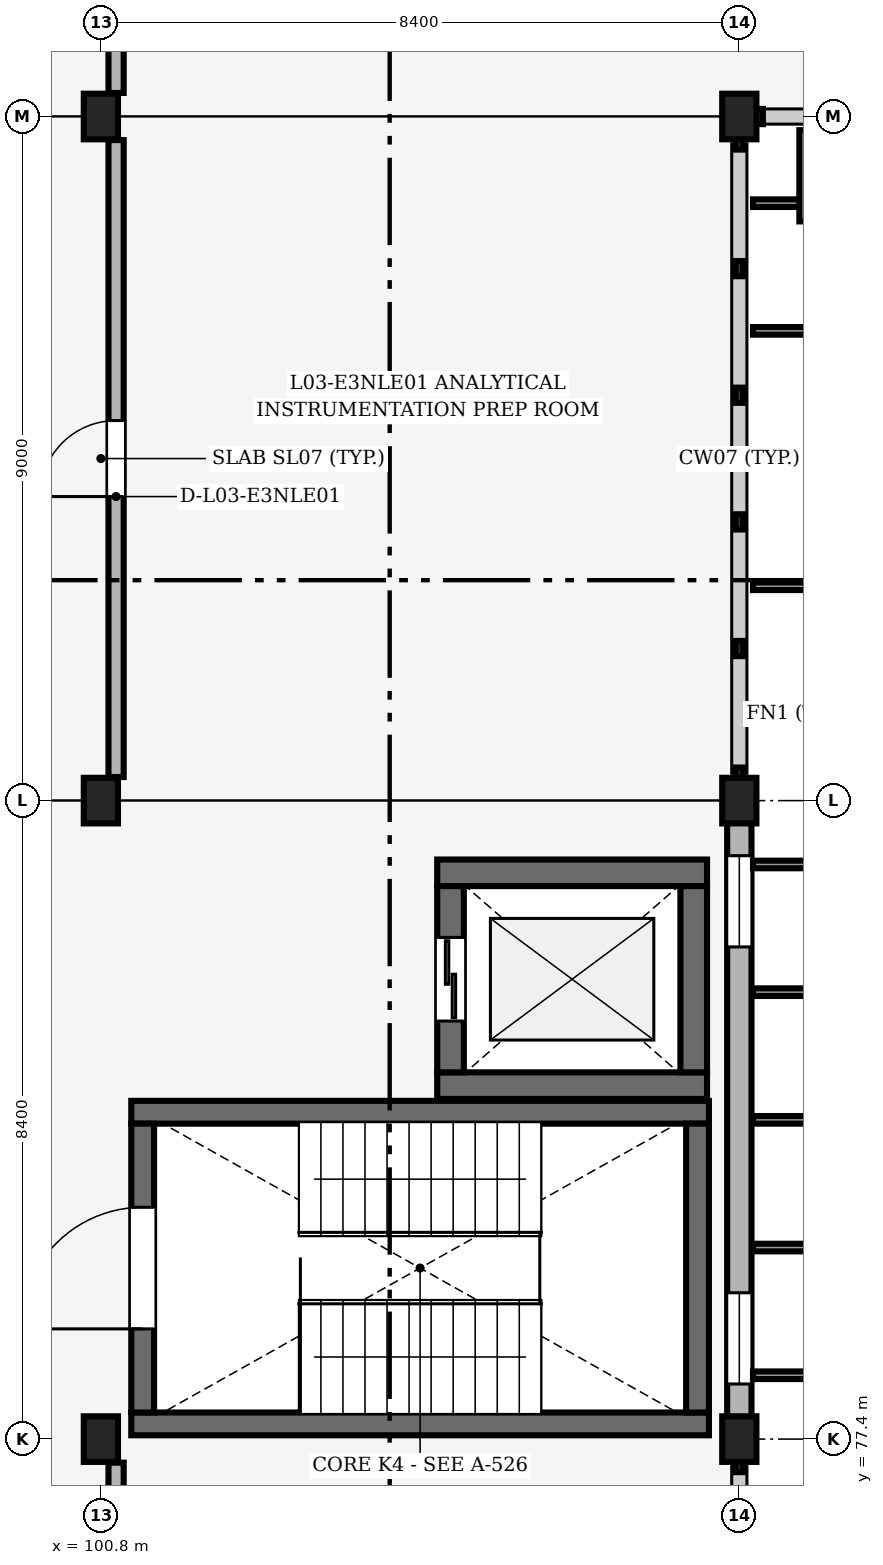
"""IFC4 building model, lengths in metres.
Left out: names, types, materials, properties, quantities, classifications, styles, units other than length and angle.
Written with IfcOpenShell. Run it as: python <this file> out.ifc"""

import sys

from ifc_helpers import new_model, si_unit, direction, frame, frame_2d, origin, origin_2d, place, context, subcontext, project, spatial, rectangle, extrude, element, fill, save


model = new_model("IFC4")
c1 = context("Model", 3, precision=1e-05, world=origin(), true_north=direction((0.0, 1.0)))
c2 = subcontext(c1, "Body", "Model", "MODEL_VIEW")
j1 = project(units=[si_unit("LENGTHUNIT", "METRE"), si_unit("PLANEANGLEUNIT", "RADIAN")], contexts=[c1])
p1 = place(None, origin())
s1 = spatial("IfcSite", under=j1, at=p1, CompositionType="ELEMENT")
p2 = place(p1, origin())
s2 = spatial("IfcBuilding", under=s1, at=p2, CompositionType="ELEMENT")
p3 = place(p2, frame((0.0, 0.0, 13.2)))
s3 = spatial("IfcBuildingStorey", under=s2, at=p3, CompositionType="ELEMENT", Elevation=13.2)
for number, where, z_axis, x_axis in (
    (1, (100.8, 77.4, 0.0), (0.0, 0.0, 1.0), (1.0, 0.0, 0.0)),
    (2, (100.8, 85.8, 0.0), (0.0, 0.0, 1.0), (1.0, 0.0, 0.0)),
    (3, (100.8, 94.8, 0.0), (0.0, 0.0, 1.0), (1.0, 0.0, 0.0)),
    (4, (109.2, 77.4, 0.0), (0.0, 0.0, 1.0), (1.0, 0.0, 0.0)),
    (5, (109.2, 85.8, 0.0), (0.0, 0.0, 1.0), (1.0, 0.0, 0.0)),
    (6, (109.2, 94.8, 0.0), (0.0, 0.0, 1.0), (1.0, 0.0, 0.0)),
):
    element("IfcColumn", number, at=place(p3, frame(where, z_axis=z_axis, x_axis=x_axis)), inside=s3, PredefinedType="COLUMN", context=c2, shape_type="SweptSolid", body=[
        extrude(rectangle(XDim=0.45, YDim=0.6, at=origin_2d()), origin(), (0.0, 0.0, 1.0), 4.2),
    ])
p4 = place(p3, frame((109.2, 77.675, 0.0), z_axis=(0.0, 0.0, 1.0), x_axis=(0.0, 1.0, 0.0)))
e7 = element("IfcWall", 7, at=p4, inside=s3, PredefinedType="SOLIDWALL", context=c2, shape_type="SweptSolid", body=[
    extrude(rectangle(XDim=7.85, YDim=0.32, at=frame_2d((3.925, 0.0))), origin(), (0.0, 0.0, 1.0), 2.94),
])
p5 = place(p4, frame((0.45, 0.0, 0.85)))
e8 = element("IfcOpeningElement", 8, at=p5, cuts=e7, PredefinedType="OPENING", context=c2, shape_type="SweptSolid", body=[
    extrude(rectangle(XDim=1.2, YDim=1.8, at=frame_2d((0.6, 0.9))), frame((0.0, 0.17, 0.0), z_axis=(0.0, -1.0, 0.0), x_axis=(1.0, 0.0, 0.0)), (0.0, 0.0, 1.0), 0.34),
])
p6 = place(p4, frame((6.2, 0.0, 0.85)))
e9 = element("IfcOpeningElement", 9, at=p6, cuts=e7, PredefinedType="OPENING", context=c2, shape_type="SweptSolid", body=[
    extrude(rectangle(XDim=1.2, YDim=1.8, at=frame_2d((0.6, 0.9))), frame((0.0, 0.17, 0.0), z_axis=(0.0, -1.0, 0.0), x_axis=(1.0, 0.0, 0.0)), (0.0, 0.0, 1.0), 0.34),
])
for number, where, z_axis, x_axis in (
    (10, (101.2, 77.6, 0.0), (0.0, 0.0, 1.0), (1.0, 0.0, 0.0)),
    (11, (101.2, 81.7, 0.0), (0.0, 0.0, 1.0), (1.0, 0.0, 0.0)),
):
    element("IfcWall", number, at=place(p3, frame(where, z_axis=z_axis, x_axis=x_axis)), inside=s3, PredefinedType="SHEAR", context=c2, shape_type="SweptSolid", body=[
        extrude(rectangle(XDim=7.6, YDim=0.3, at=frame_2d((3.8, 0.0))), origin(), (0.0, 0.0, 1.0), 4.025),
    ])
p7 = place(p3, frame((101.35, 77.75, 0.0), z_axis=(0.0, 0.0, 1.0), x_axis=(0.0, 1.0, 0.0)))
e12 = element("IfcWall", 12, at=p7, inside=s3, PredefinedType="SHEAR", context=c2, shape_type="SweptSolid", body=[
    extrude(rectangle(XDim=3.8, YDim=0.3, at=frame_2d((1.9, 0.0))), origin(), (0.0, 0.0, 1.0), 4.025),
])
p8 = place(p7, frame((1.1, 0.0, 0.0)))
e13 = element("IfcOpeningElement", 13, at=p8, cuts=e12, PredefinedType="OPENING", context=c2, shape_type="SweptSolid", body=[
    extrude(rectangle(XDim=1.6, YDim=2.2, at=frame_2d((0.8, 1.1))), frame((0.0, 0.16, 0.0), z_axis=(0.0, -1.0, 0.0), x_axis=(1.0, 0.0, 0.0)), (0.0, 0.0, 1.0), 0.32),
])
p9 = place(p3, frame((108.65, 77.75, 0.0), z_axis=(0.0, 0.0, 1.0), x_axis=(0.0, 1.0, 0.0)))
e14 = element("IfcWall", 14, at=p9, inside=s3, PredefinedType="SHEAR", context=c2, shape_type="SweptSolid", body=[
    extrude(rectangle(XDim=3.8, YDim=0.3, at=frame_2d((1.9, 0.0))), origin(), (0.0, 0.0, 1.0), 4.025),
])
for number, where, z_axis, x_axis in (
    (15, (105.225, 82.05, 0.0), (0.0, 0.0, 1.0), (1.0, 0.0, 0.0)),
    (16, (105.225, 84.85, 0.0), (0.0, 0.0, 1.0), (1.0, 0.0, 0.0)),
):
    element("IfcWall", number, at=place(p3, frame(where, z_axis=z_axis, x_axis=x_axis)), inside=s3, PredefinedType="SHEAR", context=c2, shape_type="SweptSolid", body=[
        extrude(rectangle(XDim=3.55, YDim=0.35, at=frame_2d((1.775, 0.0))), origin(), (0.0, 0.0, 1.0), 3.92),
    ])
p10 = place(p3, frame((105.4, 82.225, 0.0), z_axis=(0.0, 0.0, 1.0), x_axis=(0.0, 1.0, 0.0)))
e17 = element("IfcWall", 17, at=p10, inside=s3, PredefinedType="SHEAR", context=c2, shape_type="SweptSolid", body=[
    extrude(rectangle(XDim=2.45, YDim=0.35, at=frame_2d((1.225, 0.0))), origin(), (0.0, 0.0, 1.0), 3.92),
])
p11 = place(p10, frame((0.675, 0.0, 0.0)))
e18 = element("IfcOpeningElement", 18, at=p11, cuts=e17, PredefinedType="OPENING", context=c2, shape_type="SweptSolid", body=[
    extrude(rectangle(XDim=1.1, YDim=2.2, at=frame_2d((0.55, 1.1))), frame((0.0, 0.185, 0.0), z_axis=(0.0, -1.0, 0.0), x_axis=(1.0, 0.0, 0.0)), (0.0, 0.0, 1.0), 0.37),
])
p12 = place(p3, frame((108.6, 82.225, 0.0), z_axis=(0.0, 0.0, 1.0), x_axis=(0.0, 1.0, 0.0)))
e19 = element("IfcWall", 19, at=p12, inside=s3, PredefinedType="SHEAR", context=c2, shape_type="SweptSolid", body=[
    extrude(rectangle(XDim=2.45, YDim=0.35, at=frame_2d((1.225, 0.0))), origin(), (0.0, 0.0, 1.0), 3.92),
])
p13 = place(p3, frame((101.0, 95.11, 0.0), z_axis=(0.0, 0.0, 1.0), x_axis=(0.0, 1.0, 0.0)))
e20 = element("IfcWall", 20, at=p13, inside=s3, PredefinedType="PARTITIONING", context=c2, shape_type="SweptSolid", body=[
    extrude(rectangle(XDim=5.785, YDim=0.2, at=frame_2d((2.893, 0.0))), origin(), (0.0, 0.0, 1.0), 3.48),
])
p14 = place(p3, frame((101.0, 86.11, 0.0), z_axis=(0.0, 0.0, 1.0), x_axis=(0.0, 1.0, 0.0)))
e21 = element("IfcWall", 21, at=p14, inside=s3, PredefinedType="PARTITIONING", context=c2, shape_type="SweptSolid", body=[
    extrude(rectangle(XDim=8.38, YDim=0.2, at=frame_2d((4.19, 0.0))), origin(), (0.0, 0.0, 1.0), 3.43),
])
p15 = place(p14, frame((3.69, 0.0, 0.0)))
e22 = element("IfcOpeningElement", 22, at=p15, cuts=e21, PredefinedType="OPENING", context=c2, shape_type="SweptSolid", body=[
    extrude(rectangle(XDim=1.0, YDim=2.15, at=frame_2d((0.5, 1.075))), frame((0.0, 0.11, 0.0), z_axis=(0.0, -1.0, 0.0), x_axis=(1.0, 0.0, 0.0)), (0.0, 0.0, 1.0), 0.22),
])
p16 = place(p3, frame((101.0, 69.31, 0.0), z_axis=(0.0, 0.0, 1.0), x_axis=(0.0, 1.0, 0.0)))
e23 = element("IfcWall", 23, at=p16, inside=s3, PredefinedType="PARTITIONING", context=c2, shape_type="SweptSolid", body=[
    extrude(rectangle(XDim=7.78, YDim=0.2, at=frame_2d((3.89, 0.0))), origin(), (0.0, 0.0, 1.0), 3.24),
])
p17 = place(p16, frame((1.39, 0.0, 0.0)))
e24 = element("IfcOpeningElement", 24, at=p17, cuts=e23, PredefinedType="OPENING", context=c2, shape_type="SweptSolid", body=[
    extrude(rectangle(XDim=0.9, YDim=2.1, at=frame_2d((0.45, 1.05))), frame((0.0, 0.11, 0.0), z_axis=(0.0, -1.0, 0.0), x_axis=(1.0, 0.0, 0.0)), (0.0, 0.0, 1.0), 0.22),
])
p18 = place(p16, frame((4.965, 0.0, 0.0)))
e25 = element("IfcOpeningElement", 25, at=p18, cuts=e23, PredefinedType="OPENING", context=c2, shape_type="SweptSolid", body=[
    extrude(rectangle(XDim=1.05, YDim=2.2, at=frame_2d((0.525, 1.1))), frame((0.0, 0.11, 0.0), z_axis=(0.0, -1.0, 0.0), x_axis=(1.0, 0.0, 0.0)), (0.0, 0.0, 1.0), 0.22),
])
p19 = place(p5, origin())
e26 = element("IfcWindow", 26, at=p19, inside=s3, PartitioningType="SINGLE_PANEL", PredefinedType="WINDOW", context=c2, shape_type="SweptSolid", body=[
    extrude(rectangle(XDim=1.2, YDim=1.8, at=frame_2d((0.6, 0.9))), frame((0.0, 0.03, 0.0), z_axis=(0.0, -1.0, 0.0), x_axis=(1.0, 0.0, 0.0)), (0.0, 0.0, 1.0), 0.06),
])
fill(e8, e26)
p20 = place(p6, origin())
e27 = element("IfcWindow", 27, at=p20, inside=s3, PartitioningType="SINGLE_PANEL", PredefinedType="WINDOW", context=c2, shape_type="SweptSolid", body=[
    extrude(rectangle(XDim=1.2, YDim=1.8, at=frame_2d((0.6, 0.9))), frame((0.0, 0.03, 0.0), z_axis=(0.0, -1.0, 0.0), x_axis=(1.0, 0.0, 0.0)), (0.0, 0.0, 1.0), 0.06),
])
fill(e9, e27)
p21 = place(p8, origin())
e28 = element("IfcDoor", 28, at=p21, inside=s3, OperationType="DOUBLE_DOOR_SINGLE_SWING", PredefinedType="DOOR", context=c2, shape_type="SweptSolid", body=[
    extrude(rectangle(XDim=1.6, YDim=2.2, at=frame_2d((0.8, 1.1))), frame((0.0, 0.025, 0.0), z_axis=(0.0, -1.0, 0.0), x_axis=(1.0, 0.0, 0.0)), (0.0, 0.0, 1.0), 0.05),
])
fill(e13, e28)
p22 = place(p11, origin())
e29 = element("IfcDoor", 29, at=p22, inside=s3, OperationType="DOUBLE_DOOR_SLIDING", PredefinedType="DOOR", context=c2, shape_type="SweptSolid", body=[
    extrude(rectangle(XDim=1.1, YDim=2.2, at=frame_2d((0.55, 1.1))), frame((0.0, 0.025, 0.0), z_axis=(0.0, -1.0, 0.0), x_axis=(1.0, 0.0, 0.0)), (0.0, 0.0, 1.0), 0.05),
])
fill(e18, e29)
p23 = place(p15, origin())
e30 = element("IfcDoor", 30, at=p23, inside=s3, OperationType="SINGLE_SWING_LEFT", PredefinedType="DOOR", context=c2, shape_type="SweptSolid", body=[
    extrude(rectangle(XDim=1.0, YDim=2.15, at=frame_2d((0.5, 1.075))), frame((0.0, 0.025, 0.0), z_axis=(0.0, -1.0, 0.0), x_axis=(1.0, 0.0, 0.0)), (0.0, 0.0, 1.0), 0.05),
])
fill(e22, e30)
save(model, sys.argv[1])
